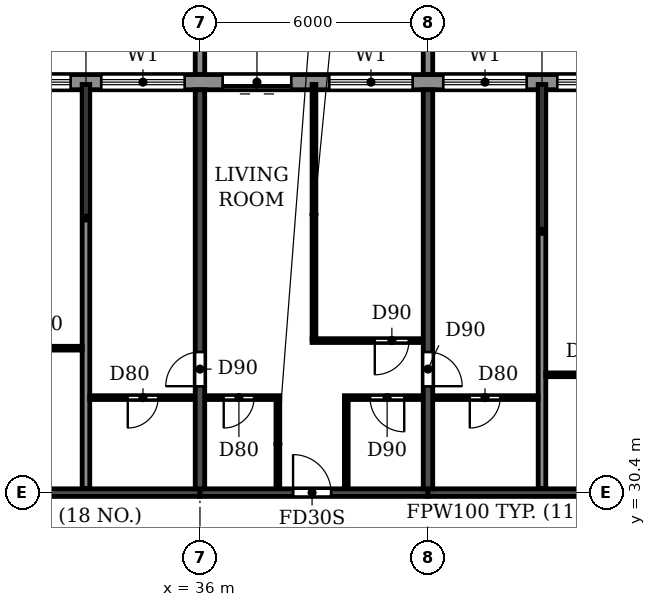
"""IFC4 building model, lengths in metres.
Left out: names, types, materials, properties, quantities, classifications, styles, units other than length and angle.
Written with IfcOpenShell. Run it as: python <this file> out.ifc"""

import sys

from ifc_helpers import new_model, si_unit, direction, frame, frame_2d, origin, place, context, subcontext, project, spatial, polyline, rectangle, outline, extrude, source, transform, mapped, element, fill, save


model = new_model("IFC4")
c1 = context("Model", 3, precision=1e-05, world=origin(), true_north=direction((0.0, 1.0)))
c2 = subcontext(c1, "Body", "Model", "MODEL_VIEW")
j1 = project(units=[si_unit("LENGTHUNIT", "METRE"), si_unit("PLANEANGLEUNIT", "RADIAN")], contexts=[c1])
p1 = place(None, origin())
s1 = spatial("IfcSite", under=j1, at=p1, CompositionType="ELEMENT")
p2 = place(p1, origin())
s2 = spatial("IfcBuilding", under=s1, at=p2, CompositionType="ELEMENT")
p3 = place(p2, frame((0.0, 0.0, 175.2)))
s3 = spatial("IfcBuildingStorey", under=s2, at=p3, CompositionType="ELEMENT", Elevation=175.2)
p4 = place(p3, frame((36.0, 30.5, 0.0), z_axis=(0.0, 0.0, 1.0), x_axis=(0.0, 1.0, 0.0)))
e1 = element("IfcWall", 1, at=p4, inside=s3, PredefinedType="SHEAR", context=c2, shape_type="SweptSolid", body=[
    extrude(rectangle(XDim=10.5, YDim=0.25, at=frame_2d((5.25, 0.0))), origin(), (0.0, 0.0, 1.0), 3.08),
])
p5 = place(p4, frame((2.7, 0.0, 0.0)))
e2 = element("IfcOpeningElement", 2, at=p5, cuts=e1, PredefinedType="OPENING", context=c2, shape_type="SweptSolid", body=[
    extrude(rectangle(XDim=0.9, YDim=2.1, at=frame_2d((0.45, 1.05))), frame((0.0, 0.135, 0.0), z_axis=(0.0, -1.0, 0.0), x_axis=(1.0, 0.0, 0.0)), (0.0, 0.0, 1.0), 0.27),
])
p6 = place(p3, frame((42.0, 30.5, 0.0), z_axis=(0.0, 0.0, 1.0), x_axis=(0.0, 1.0, 0.0)))
e3 = element("IfcWall", 3, at=p6, inside=s3, PredefinedType="SHEAR", context=c2, shape_type="SweptSolid", body=[
    extrude(rectangle(XDim=10.5, YDim=0.25, at=frame_2d((5.25, 0.0))), origin(), (0.0, 0.0, 1.0), 3.08),
])
p7 = place(p6, frame((2.7, 0.0, 0.0)))
e4 = element("IfcOpeningElement", 4, at=p7, cuts=e3, PredefinedType="OPENING", context=c2, shape_type="SweptSolid", body=[
    extrude(rectangle(XDim=0.9, YDim=2.1, at=frame_2d((0.45, 1.05))), frame((0.0, 0.135, 0.0), z_axis=(0.0, -1.0, 0.0), x_axis=(1.0, 0.0, 0.0)), (0.0, 0.0, 1.0), 0.27),
])
p8 = place(p3, frame((30.0, 30.4, 0.0), z_axis=(0.0, 0.0, 1.0), x_axis=(1.0, 0.0, 0.0)))
e5 = element("IfcWall", 5, at=p8, inside=s3, PredefinedType="SHEAR", context=c2, shape_type="SweptSolid", body=[
    extrude(rectangle(XDim=6.0, YDim=0.2, at=frame_2d((3.0, 0.0))), origin(), (0.0, 0.0, 1.0), 2.48),
])
p9 = place(p3, frame((36.0, 30.4, 0.0), z_axis=(0.0, 0.0, 1.0), x_axis=(1.0, 0.0, 0.0)))
e6 = element("IfcWall", 6, at=p9, inside=s3, PredefinedType="SHEAR", context=c2, shape_type="SweptSolid", body=[
    extrude(rectangle(XDim=6.0, YDim=0.2, at=frame_2d((3.0, 0.0))), origin(), (0.0, 0.0, 1.0), 2.48),
])
p10 = place(p9, frame((2.45, 0.0, 0.0)))
e7 = element("IfcOpeningElement", 7, at=p10, cuts=e6, PredefinedType="OPENING", context=c2, shape_type="SweptSolid", body=[
    extrude(rectangle(XDim=1.0, YDim=2.1, at=frame_2d((0.5, 1.05))), frame((0.0, 0.11, 0.0), z_axis=(0.0, -1.0, 0.0), x_axis=(1.0, 0.0, 0.0)), (0.0, 0.0, 1.0), 0.22),
])
p11 = place(p3, frame((42.0, 30.4, 0.0), z_axis=(0.0, 0.0, 1.0), x_axis=(1.0, 0.0, 0.0)))
e8 = element("IfcWall", 8, at=p11, inside=s3, PredefinedType="SHEAR", context=c2, shape_type="SweptSolid", body=[
    extrude(rectangle(XDim=6.0, YDim=0.2, at=frame_2d((3.0, 0.0))), origin(), (0.0, 0.0, 1.0), 2.48),
])
p12 = place(p3, frame((79.317, 41.2, 0.0), z_axis=(0.0, 0.0, 1.0), x_axis=(-1.0, 0.0, 0.0)))
e9 = element("IfcWall", 9, at=p12, inside=s3, PredefinedType="STANDARD", context=c2, shape_type="SweptSolid", body=[
    extrude(rectangle(XDim=56.634, YDim=0.4, at=frame_2d((28.317, 0.0))), origin(), (0.0, 0.0, 1.0), 3.08),
])
p13 = place(p12, frame((52.717, 0.0, 0.9)))
e10 = element("IfcOpeningElement", 10, at=p13, cuts=e9, PredefinedType="OPENING", context=c2, shape_type="SweptSolid", body=[
    extrude(rectangle(XDim=2.2, YDim=1.5, at=frame_2d((1.1, 0.75))), frame((0.0, 0.21, 0.0), z_axis=(0.0, -1.0, 0.0), x_axis=(1.0, 0.0, 0.0)), (0.0, 0.0, 1.0), 0.42),
])
p14 = place(p12, frame((49.917, 0.0, 0.0)))
e11 = element("IfcOpeningElement", 11, at=p14, cuts=e9, PredefinedType="OPENING", context=c2, shape_type="SweptSolid", body=[
    extrude(rectangle(XDim=1.8, YDim=2.4, at=frame_2d((0.9, 1.2))), frame((0.0, 0.21, 0.0), z_axis=(0.0, -1.0, 0.0), x_axis=(1.0, 0.0, 0.0)), (0.0, 0.0, 1.0), 0.42),
])
p15 = place(p12, frame((46.717, 0.0, 0.9)))
e12 = element("IfcOpeningElement", 12, at=p15, cuts=e9, PredefinedType="OPENING", context=c2, shape_type="SweptSolid", body=[
    extrude(rectangle(XDim=2.2, YDim=1.5, at=frame_2d((1.1, 0.75))), frame((0.0, 0.21, 0.0), z_axis=(0.0, -1.0, 0.0), x_axis=(1.0, 0.0, 0.0)), (0.0, 0.0, 1.0), 0.42),
])
p16 = place(p12, frame((43.717, 0.0, 0.9)))
e13 = element("IfcOpeningElement", 13, at=p16, cuts=e9, PredefinedType="OPENING", context=c2, shape_type="SweptSolid", body=[
    extrude(rectangle(XDim=2.2, YDim=1.5, at=frame_2d((1.1, 0.75))), frame((0.0, 0.21, 0.0), z_axis=(0.0, -1.0, 0.0), x_axis=(1.0, 0.0, 0.0)), (0.0, 0.0, 1.0), 0.42),
])
p17 = place(p12, frame((40.917, 0.0, 0.0)))
e14 = element("IfcOpeningElement", 14, at=p17, cuts=e9, PredefinedType="OPENING", context=c2, shape_type="SweptSolid", body=[
    extrude(rectangle(XDim=1.8, YDim=2.4, at=frame_2d((0.9, 1.2))), frame((0.0, 0.21, 0.0), z_axis=(0.0, -1.0, 0.0), x_axis=(1.0, 0.0, 0.0)), (0.0, 0.0, 1.0), 0.42),
])
p18 = place(p12, frame((37.717, 0.0, 0.9)))
e15 = element("IfcOpeningElement", 15, at=p18, cuts=e9, PredefinedType="OPENING", context=c2, shape_type="SweptSolid", body=[
    extrude(rectangle(XDim=2.2, YDim=1.5, at=frame_2d((1.1, 0.75))), frame((0.0, 0.21, 0.0), z_axis=(0.0, -1.0, 0.0), x_axis=(1.0, 0.0, 0.0)), (0.0, 0.0, 1.0), 0.42),
])
p19 = place(p12, frame((34.717, 0.0, 0.9)))
e16 = element("IfcOpeningElement", 16, at=p19, cuts=e9, PredefinedType="OPENING", context=c2, shape_type="SweptSolid", body=[
    extrude(rectangle(XDim=2.2, YDim=1.5, at=frame_2d((1.1, 0.75))), frame((0.0, 0.21, 0.0), z_axis=(0.0, -1.0, 0.0), x_axis=(1.0, 0.0, 0.0)), (0.0, 0.0, 1.0), 0.42),
])
p20 = place(p12, frame((31.717, 0.0, 0.9)))
e17 = element("IfcOpeningElement", 17, at=p20, cuts=e9, PredefinedType="OPENING", context=c2, shape_type="SweptSolid", body=[
    extrude(rectangle(XDim=2.2, YDim=1.5, at=frame_2d((1.1, 0.75))), frame((0.0, 0.21, 0.0), z_axis=(0.0, -1.0, 0.0), x_axis=(1.0, 0.0, 0.0)), (0.0, 0.0, 1.0), 0.42),
])
p21 = place(p12, frame((28.717, 0.0, 0.9)))
e18 = element("IfcOpeningElement", 18, at=p21, cuts=e9, PredefinedType="OPENING", context=c2, shape_type="SweptSolid", body=[
    extrude(rectangle(XDim=2.2, YDim=1.5, at=frame_2d((1.1, 0.75))), frame((0.0, 0.21, 0.0), z_axis=(0.0, -1.0, 0.0), x_axis=(1.0, 0.0, 0.0)), (0.0, 0.0, 1.0), 0.42),
])
p22 = place(p12, frame((25.917, 0.0, 0.0)))
e19 = element("IfcOpeningElement", 19, at=p22, cuts=e9, PredefinedType="OPENING", context=c2, shape_type="SweptSolid", body=[
    extrude(rectangle(XDim=1.8, YDim=2.4, at=frame_2d((0.9, 1.2))), frame((0.0, 0.21, 0.0), z_axis=(0.0, -1.0, 0.0), x_axis=(1.0, 0.0, 0.0)), (0.0, 0.0, 1.0), 0.42),
])
p23 = place(p12, frame((22.717, 0.0, 0.9)))
e20 = element("IfcOpeningElement", 20, at=p23, cuts=e9, PredefinedType="OPENING", context=c2, shape_type="SweptSolid", body=[
    extrude(rectangle(XDim=2.2, YDim=1.5, at=frame_2d((1.1, 0.75))), frame((0.0, 0.21, 0.0), z_axis=(0.0, -1.0, 0.0), x_axis=(1.0, 0.0, 0.0)), (0.0, 0.0, 1.0), 0.42),
])
p24 = place(p12, frame((19.917, 0.0, 0.0)))
e21 = element("IfcOpeningElement", 21, at=p24, cuts=e9, PredefinedType="OPENING", context=c2, shape_type="SweptSolid", body=[
    extrude(rectangle(XDim=1.8, YDim=2.4, at=frame_2d((0.9, 1.2))), frame((0.0, 0.21, 0.0), z_axis=(0.0, -1.0, 0.0), x_axis=(1.0, 0.0, 0.0)), (0.0, 0.0, 1.0), 0.42),
])
p25 = place(p12, frame((16.717, 0.0, 0.9)))
e22 = element("IfcOpeningElement", 22, at=p25, cuts=e9, PredefinedType="OPENING", context=c2, shape_type="SweptSolid", body=[
    extrude(rectangle(XDim=2.2, YDim=1.5, at=frame_2d((1.1, 0.75))), frame((0.0, 0.21, 0.0), z_axis=(0.0, -1.0, 0.0), x_axis=(1.0, 0.0, 0.0)), (0.0, 0.0, 1.0), 0.42),
])
p26 = place(p12, frame((13.717, 0.0, 0.9)))
e23 = element("IfcOpeningElement", 23, at=p26, cuts=e9, PredefinedType="OPENING", context=c2, shape_type="SweptSolid", body=[
    extrude(rectangle(XDim=2.2, YDim=1.5, at=frame_2d((1.1, 0.75))), frame((0.0, 0.21, 0.0), z_axis=(0.0, -1.0, 0.0), x_axis=(1.0, 0.0, 0.0)), (0.0, 0.0, 1.0), 0.42),
])
p27 = place(p12, frame((10.917, 0.0, 0.0)))
e24 = element("IfcOpeningElement", 24, at=p27, cuts=e9, PredefinedType="OPENING", context=c2, shape_type="SweptSolid", body=[
    extrude(rectangle(XDim=1.8, YDim=2.4, at=frame_2d((0.9, 1.2))), frame((0.0, 0.21, 0.0), z_axis=(0.0, -1.0, 0.0), x_axis=(1.0, 0.0, 0.0)), (0.0, 0.0, 1.0), 0.42),
])
p28 = place(p12, frame((7.717, 0.0, 0.9)))
e25 = element("IfcOpeningElement", 25, at=p28, cuts=e9, PredefinedType="OPENING", context=c2, shape_type="SweptSolid", body=[
    extrude(rectangle(XDim=2.2, YDim=1.5, at=frame_2d((1.1, 0.75))), frame((0.0, 0.21, 0.0), z_axis=(0.0, -1.0, 0.0), x_axis=(1.0, 0.0, 0.0)), (0.0, 0.0, 1.0), 0.42),
])
p29 = place(p12, frame((4.717, 0.0, 0.9)))
e26 = element("IfcOpeningElement", 26, at=p29, cuts=e9, PredefinedType="OPENING", context=c2, shape_type="SweptSolid", body=[
    extrude(rectangle(XDim=2.2, YDim=1.5, at=frame_2d((1.1, 0.75))), frame((0.0, 0.21, 0.0), z_axis=(0.0, -1.0, 0.0), x_axis=(1.0, 0.0, 0.0)), (0.0, 0.0, 1.0), 0.42),
])
p30 = place(p12, frame((1.917, 0.0, 0.0)))
e27 = element("IfcOpeningElement", 27, at=p30, cuts=e9, PredefinedType="OPENING", context=c2, shape_type="SweptSolid", body=[
    extrude(rectangle(XDim=1.8, YDim=2.4, at=frame_2d((0.9, 1.2))), frame((0.0, 0.21, 0.0), z_axis=(0.0, -1.0, 0.0), x_axis=(1.0, 0.0, 0.0)), (0.0, 0.0, 1.0), 0.42),
])
m1 = source(origin(), c2, "Body", "SweptSolid", [
    extrude(outline(polyline([(0.0, 0.0), (0.25, 0.0), (0.25, 3.1), (0.0, 3.1), (0.0, 0.0)])), origin(), (0.0, 0.0, 1.0), 3.1),
])
for number, where in (
    (28, (35.875, 41.4, 0.0)),
    (29, (41.875, 41.4, 0.0)),
):
    element("IfcWall", number, at=place(p3, frame(where)), inside=s3, PredefinedType="STANDARD", context=c2, shape_type="MappedRepresentation", body=[
        mapped(m1, transform((0.0, 0.0, 0.0))),
    ])
for number, where, z_axis, x_axis in (
    (30, (33.0, 30.51, 0.0), (0.0, 0.0, 1.0), (0.0, 1.0, 0.0)),
    (31, (45.0, 30.51, 0.0), (0.0, 0.0, 1.0), (0.0, 1.0, 0.0)),
):
    element("IfcWall", number, at=place(p3, frame(where, z_axis=z_axis, x_axis=x_axis)), inside=s3, PredefinedType="PARTITIONING", context=c2, shape_type="SweptSolid", body=[
        extrude(rectangle(XDim=10.63, YDim=0.2, at=frame_2d((5.315, 0.0))), origin(), (0.0, 0.0, 1.0), 3.08),
    ])
p31 = place(p3, frame((33.1, 32.9, 0.0), z_axis=(0.0, 0.0, 1.0), x_axis=(1.0, 0.0, 0.0)))
e32 = element("IfcWall", 32, at=p31, inside=s3, PredefinedType="PARTITIONING", context=c2, shape_type="SweptSolid", body=[
    extrude(rectangle(XDim=2.765, YDim=0.1, at=frame_2d((1.382, 0.0))), origin(), (0.0, 0.0, 1.0), 3.08),
])
p32 = place(p31, frame((1.0, 0.0, 0.0)))
e33 = element("IfcOpeningElement", 33, at=p32, cuts=e32, PredefinedType="OPENING", context=c2, shape_type="SweptSolid", body=[
    extrude(rectangle(XDim=0.8, YDim=2.1, at=frame_2d((0.4, 1.05))), frame((0.0, 0.06, 0.0), z_axis=(0.0, -1.0, 0.0), x_axis=(1.0, 0.0, 0.0)), (0.0, 0.0, 1.0), 0.12),
])
p33 = place(p3, frame((36.135, 32.9, 0.0), z_axis=(0.0, 0.0, 1.0), x_axis=(1.0, 0.0, 0.0)))
e34 = element("IfcWall", 34, at=p33, inside=s3, PredefinedType="PARTITIONING", context=c2, shape_type="SweptSolid", body=[
    extrude(rectangle(XDim=1.965, YDim=0.1, at=frame_2d((0.982, 0.0))), origin(), (0.0, 0.0, 1.0), 3.08),
])
p34 = place(p33, frame((0.49, 0.0, 0.0)))
e35 = element("IfcOpeningElement", 35, at=p34, cuts=e34, PredefinedType="OPENING", context=c2, shape_type="SweptSolid", body=[
    extrude(rectangle(XDim=0.8, YDim=2.1, at=frame_2d((0.4, 1.05))), frame((0.0, 0.06, 0.0), z_axis=(0.0, -1.0, 0.0), x_axis=(1.0, 0.0, 0.0)), (0.0, 0.0, 1.0), 0.12),
])
p35 = place(p3, frame((39.8, 32.9, 0.0), z_axis=(0.0, 0.0, 1.0), x_axis=(1.0, 0.0, 0.0)))
e36 = element("IfcWall", 36, at=p35, inside=s3, PredefinedType="PARTITIONING", context=c2, shape_type="SweptSolid", body=[
    extrude(rectangle(XDim=2.065, YDim=0.1, at=frame_2d((1.032, 0.0))), origin(), (0.0, 0.0, 1.0), 3.08),
])
p36 = place(p35, frame((0.675, 0.0, 0.0)))
e37 = element("IfcOpeningElement", 37, at=p36, cuts=e36, PredefinedType="OPENING", context=c2, shape_type="SweptSolid", body=[
    extrude(rectangle(XDim=0.9, YDim=2.1, at=frame_2d((0.45, 1.05))), frame((0.0, 0.06, 0.0), z_axis=(0.0, -1.0, 0.0), x_axis=(1.0, 0.0, 0.0)), (0.0, 0.0, 1.0), 0.12),
])
p37 = place(p3, frame((42.135, 32.9, 0.0), z_axis=(0.0, 0.0, 1.0), x_axis=(1.0, 0.0, 0.0)))
e38 = element("IfcWall", 38, at=p37, inside=s3, PredefinedType="PARTITIONING", context=c2, shape_type="SweptSolid", body=[
    extrude(rectangle(XDim=2.765, YDim=0.1, at=frame_2d((1.382, 0.0))), origin(), (0.0, 0.0, 1.0), 3.08),
])
p38 = place(p37, frame((0.965, 0.0, 0.0)))
e39 = element("IfcOpeningElement", 39, at=p38, cuts=e38, PredefinedType="OPENING", context=c2, shape_type="SweptSolid", body=[
    extrude(rectangle(XDim=0.8, YDim=2.1, at=frame_2d((0.4, 1.05))), frame((0.0, 0.06, 0.0), z_axis=(0.0, -1.0, 0.0), x_axis=(1.0, 0.0, 0.0)), (0.0, 0.0, 1.0), 0.12),
])
p39 = place(p3, frame((45.1, 33.5, 0.0), z_axis=(0.0, 0.0, 1.0), x_axis=(1.0, 0.0, 0.0)))
e40 = element("IfcWall", 40, at=p39, inside=s3, PredefinedType="PARTITIONING", context=c2, shape_type="SweptSolid", body=[
    extrude(rectangle(XDim=2.765, YDim=0.1, at=frame_2d((1.382, 0.0))), origin(), (0.0, 0.0, 1.0), 3.08),
])
p40 = place(p39, frame((1.0, 0.0, 0.0)))
e41 = element("IfcOpeningElement", 41, at=p40, cuts=e40, PredefinedType="OPENING", context=c2, shape_type="SweptSolid", body=[
    extrude(rectangle(XDim=0.8, YDim=2.1, at=frame_2d((0.4, 1.05))), frame((0.0, 0.06, 0.0), z_axis=(0.0, -1.0, 0.0), x_axis=(1.0, 0.0, 0.0)), (0.0, 0.0, 1.0), 0.12),
])
p41 = place(p3, frame((30.135, 34.2, 0.0), z_axis=(0.0, 0.0, 1.0), x_axis=(1.0, 0.0, 0.0)))
e42 = element("IfcWall", 42, at=p41, inside=s3, PredefinedType="PARTITIONING", context=c2, shape_type="SweptSolid", body=[
    extrude(rectangle(XDim=2.765, YDim=0.1, at=frame_2d((1.382, 0.0))), origin(), (0.0, 0.0, 1.0), 3.08),
])
p42 = place(p41, frame((0.965, 0.0, 0.0)))
e43 = element("IfcOpeningElement", 43, at=p42, cuts=e42, PredefinedType="OPENING", context=c2, shape_type="SweptSolid", body=[
    extrude(rectangle(XDim=0.8, YDim=2.1, at=frame_2d((0.4, 1.05))), frame((0.0, 0.06, 0.0), z_axis=(0.0, -1.0, 0.0), x_axis=(1.0, 0.0, 0.0)), (0.0, 0.0, 1.0), 0.12),
])
p43 = place(p3, frame((38.95, 34.4, 0.0), z_axis=(0.0, 0.0, 1.0), x_axis=(1.0, 0.0, 0.0)))
e44 = element("IfcWall", 44, at=p43, inside=s3, PredefinedType="PARTITIONING", context=c2, shape_type="SweptSolid", body=[
    extrude(rectangle(XDim=2.915, YDim=0.1, at=frame_2d((1.458, 0.0))), origin(), (0.0, 0.0, 1.0), 3.08),
])
p44 = place(p43, frame((1.65, 0.0, 0.0)))
e45 = element("IfcOpeningElement", 45, at=p44, cuts=e44, PredefinedType="OPENING", context=c2, shape_type="SweptSolid", body=[
    extrude(rectangle(XDim=0.9, YDim=2.1, at=frame_2d((0.45, 1.05))), frame((0.0, 0.06, 0.0), z_axis=(0.0, -1.0, 0.0), x_axis=(1.0, 0.0, 0.0)), (0.0, 0.0, 1.0), 0.12),
])
p45 = place(p3, frame((38.05, 30.51, 0.0), z_axis=(0.0, 0.0, 1.0), x_axis=(0.0, 1.0, 0.0)))
e46 = element("IfcWall", 46, at=p45, inside=s3, PredefinedType="PARTITIONING", context=c2, shape_type="SweptSolid", body=[
    extrude(rectangle(XDim=2.34, YDim=0.1, at=frame_2d((1.17, 0.0))), origin(), (0.0, 0.0, 1.0), 3.08),
])
p46 = place(p3, frame((39.0, 34.45, 0.0), z_axis=(0.0, 0.0, 1.0), x_axis=(0.0, 1.0, 0.0)))
e47 = element("IfcWall", 47, at=p46, inside=s3, PredefinedType="PARTITIONING", context=c2, shape_type="SweptSolid", body=[
    extrude(rectangle(XDim=6.69, YDim=0.1, at=frame_2d((3.345, 0.0))), origin(), (0.0, 0.0, 1.0), 3.08),
])
p47 = place(p3, frame((39.85, 30.51, 0.0), z_axis=(0.0, 0.0, 1.0), x_axis=(0.0, 1.0, 0.0)))
e48 = element("IfcWall", 48, at=p47, inside=s3, PredefinedType="PARTITIONING", context=c2, shape_type="SweptSolid", body=[
    extrude(rectangle(XDim=2.34, YDim=0.1, at=frame_2d((1.17, 0.0))), origin(), (0.0, 0.0, 1.0), 3.08),
])
p48 = place(p15, origin())
e49 = element("IfcWindow", 49, at=p48, inside=s3, PartitioningType="DOUBLE_PANEL_HORIZONTAL", PredefinedType="WINDOW", context=c2, shape_type="SweptSolid", body=[
    extrude(rectangle(XDim=2.2, YDim=1.5, at=frame_2d((1.1, 0.75))), frame((0.0, 0.03, 0.0), z_axis=(0.0, -1.0, 0.0), x_axis=(1.0, 0.0, 0.0)), (0.0, 0.0, 1.0), 0.06),
])
fill(e12, e49)
p49 = place(p16, origin())
e50 = element("IfcWindow", 50, at=p49, inside=s3, PartitioningType="DOUBLE_PANEL_HORIZONTAL", PredefinedType="WINDOW", context=c2, shape_type="SweptSolid", body=[
    extrude(rectangle(XDim=2.2, YDim=1.5, at=frame_2d((1.1, 0.75))), frame((0.0, 0.03, 0.0), z_axis=(0.0, -1.0, 0.0), x_axis=(1.0, 0.0, 0.0)), (0.0, 0.0, 1.0), 0.06),
])
fill(e13, e50)
p50 = place(p17, origin())
e51 = element("IfcDoor", 51, at=p50, inside=s3, OperationType="DOUBLE_DOOR_SLIDING", PredefinedType="DOOR", context=c2, shape_type="SweptSolid", body=[
    extrude(rectangle(XDim=1.8, YDim=2.4, at=frame_2d((0.9, 1.2))), frame((0.0, 0.025, 0.0), z_axis=(0.0, -1.0, 0.0), x_axis=(1.0, 0.0, 0.0)), (0.0, 0.0, 1.0), 0.05),
])
fill(e14, e51)
p51 = place(p18, origin())
e52 = element("IfcWindow", 52, at=p51, inside=s3, PartitioningType="DOUBLE_PANEL_HORIZONTAL", PredefinedType="WINDOW", context=c2, shape_type="SweptSolid", body=[
    extrude(rectangle(XDim=2.2, YDim=1.5, at=frame_2d((1.1, 0.75))), frame((0.0, 0.03, 0.0), z_axis=(0.0, -1.0, 0.0), x_axis=(1.0, 0.0, 0.0)), (0.0, 0.0, 1.0), 0.06),
])
fill(e15, e52)
p52 = place(p19, origin())
e53 = element("IfcWindow", 53, at=p52, inside=s3, PartitioningType="DOUBLE_PANEL_HORIZONTAL", PredefinedType="WINDOW", context=c2, shape_type="SweptSolid", body=[
    extrude(rectangle(XDim=2.2, YDim=1.5, at=frame_2d((1.1, 0.75))), frame((0.0, 0.03, 0.0), z_axis=(0.0, -1.0, 0.0), x_axis=(1.0, 0.0, 0.0)), (0.0, 0.0, 1.0), 0.06),
])
fill(e16, e53)
p53 = place(p20, origin())
e54 = element("IfcWindow", 54, at=p53, inside=s3, PartitioningType="DOUBLE_PANEL_HORIZONTAL", PredefinedType="WINDOW", context=c2, shape_type="SweptSolid", body=[
    extrude(rectangle(XDim=2.2, YDim=1.5, at=frame_2d((1.1, 0.75))), frame((0.0, 0.03, 0.0), z_axis=(0.0, -1.0, 0.0), x_axis=(1.0, 0.0, 0.0)), (0.0, 0.0, 1.0), 0.06),
])
fill(e17, e54)
p54 = place(p32, frame((0.8, 0.0, 0.0), z_axis=(0.0, 0.0, 1.0), x_axis=(-1.0, 0.0, 0.0)))
e55 = element("IfcDoor", 55, at=p54, inside=s3, OperationType="SINGLE_SWING_RIGHT", PredefinedType="DOOR", context=c2, shape_type="SweptSolid", body=[
    extrude(rectangle(XDim=0.8, YDim=2.1, at=frame_2d((0.4, 1.05))), frame((0.0, 0.025, 0.0), z_axis=(0.0, -1.0, 0.0), x_axis=(1.0, 0.0, 0.0)), (0.0, 0.0, 1.0), 0.05),
])
fill(e33, e55)
p55 = place(p38, frame((0.8, 0.0, 0.0), z_axis=(0.0, 0.0, 1.0), x_axis=(-1.0, 0.0, 0.0)))
e56 = element("IfcDoor", 56, at=p55, inside=s3, OperationType="SINGLE_SWING_RIGHT", PredefinedType="DOOR", context=c2, shape_type="SweptSolid", body=[
    extrude(rectangle(XDim=0.8, YDim=2.1, at=frame_2d((0.4, 1.05))), frame((0.0, 0.025, 0.0), z_axis=(0.0, -1.0, 0.0), x_axis=(1.0, 0.0, 0.0)), (0.0, 0.0, 1.0), 0.05),
])
fill(e39, e56)
p56 = place(p5, origin())
e57 = element("IfcDoor", 57, at=p56, inside=s3, OperationType="SINGLE_SWING_LEFT", PredefinedType="DOOR", context=c2, shape_type="SweptSolid", body=[
    extrude(rectangle(XDim=0.9, YDim=2.1, at=frame_2d((0.45, 1.05))), frame((0.0, 0.025, 0.0), z_axis=(0.0, -1.0, 0.0), x_axis=(1.0, 0.0, 0.0)), (0.0, 0.0, 1.0), 0.05),
])
fill(e2, e57)
p57 = place(p34, frame((0.8, 0.0, 0.0), z_axis=(0.0, 0.0, 1.0), x_axis=(-1.0, 0.0, 0.0)))
e58 = element("IfcDoor", 58, at=p57, inside=s3, OperationType="SINGLE_SWING_RIGHT", PredefinedType="DOOR", context=c2, shape_type="SweptSolid", body=[
    extrude(rectangle(XDim=0.8, YDim=2.1, at=frame_2d((0.4, 1.05))), frame((0.0, 0.025, 0.0), z_axis=(0.0, -1.0, 0.0), x_axis=(1.0, 0.0, 0.0)), (0.0, 0.0, 1.0), 0.05),
])
fill(e35, e58)
p58 = place(p10, origin())
e59 = element("IfcDoor", 59, at=p58, inside=s3, OperationType="SINGLE_SWING_LEFT", PredefinedType="DOOR", context=c2, shape_type="SweptSolid", body=[
    extrude(rectangle(XDim=1.0, YDim=2.1, at=frame_2d((0.5, 1.05))), frame((0.0, 0.025, 0.0), z_axis=(0.0, -1.0, 0.0), x_axis=(1.0, 0.0, 0.0)), (0.0, 0.0, 1.0), 0.05),
])
fill(e7, e59)
p59 = place(p36, frame((0.9, 0.0, 0.0), z_axis=(0.0, 0.0, 1.0), x_axis=(-1.0, 0.0, 0.0)))
e60 = element("IfcDoor", 60, at=p59, inside=s3, OperationType="SINGLE_SWING_LEFT", PredefinedType="DOOR", context=c2, shape_type="SweptSolid", body=[
    extrude(rectangle(XDim=0.9, YDim=2.1, at=frame_2d((0.45, 1.05))), frame((0.0, 0.025, 0.0), z_axis=(0.0, -1.0, 0.0), x_axis=(1.0, 0.0, 0.0)), (0.0, 0.0, 1.0), 0.05),
])
fill(e37, e60)
p60 = place(p44, frame((0.9, 0.0, 0.0), z_axis=(0.0, 0.0, 1.0), x_axis=(-1.0, 0.0, 0.0)))
e61 = element("IfcDoor", 61, at=p60, inside=s3, OperationType="SINGLE_SWING_RIGHT", PredefinedType="DOOR", context=c2, shape_type="SweptSolid", body=[
    extrude(rectangle(XDim=0.9, YDim=2.1, at=frame_2d((0.45, 1.05))), frame((0.0, 0.025, 0.0), z_axis=(0.0, -1.0, 0.0), x_axis=(1.0, 0.0, 0.0)), (0.0, 0.0, 1.0), 0.05),
])
fill(e45, e61)
p61 = place(p7, frame((0.9, 0.0, 0.0), z_axis=(0.0, 0.0, 1.0), x_axis=(-1.0, 0.0, 0.0)))
e62 = element("IfcDoor", 62, at=p61, inside=s3, OperationType="SINGLE_SWING_RIGHT", PredefinedType="DOOR", context=c2, shape_type="SweptSolid", body=[
    extrude(rectangle(XDim=0.9, YDim=2.1, at=frame_2d((0.45, 1.05))), frame((0.0, 0.025, 0.0), z_axis=(0.0, -1.0, 0.0), x_axis=(1.0, 0.0, 0.0)), (0.0, 0.0, 1.0), 0.05),
])
fill(e4, e62)
save(model, sys.argv[1])
